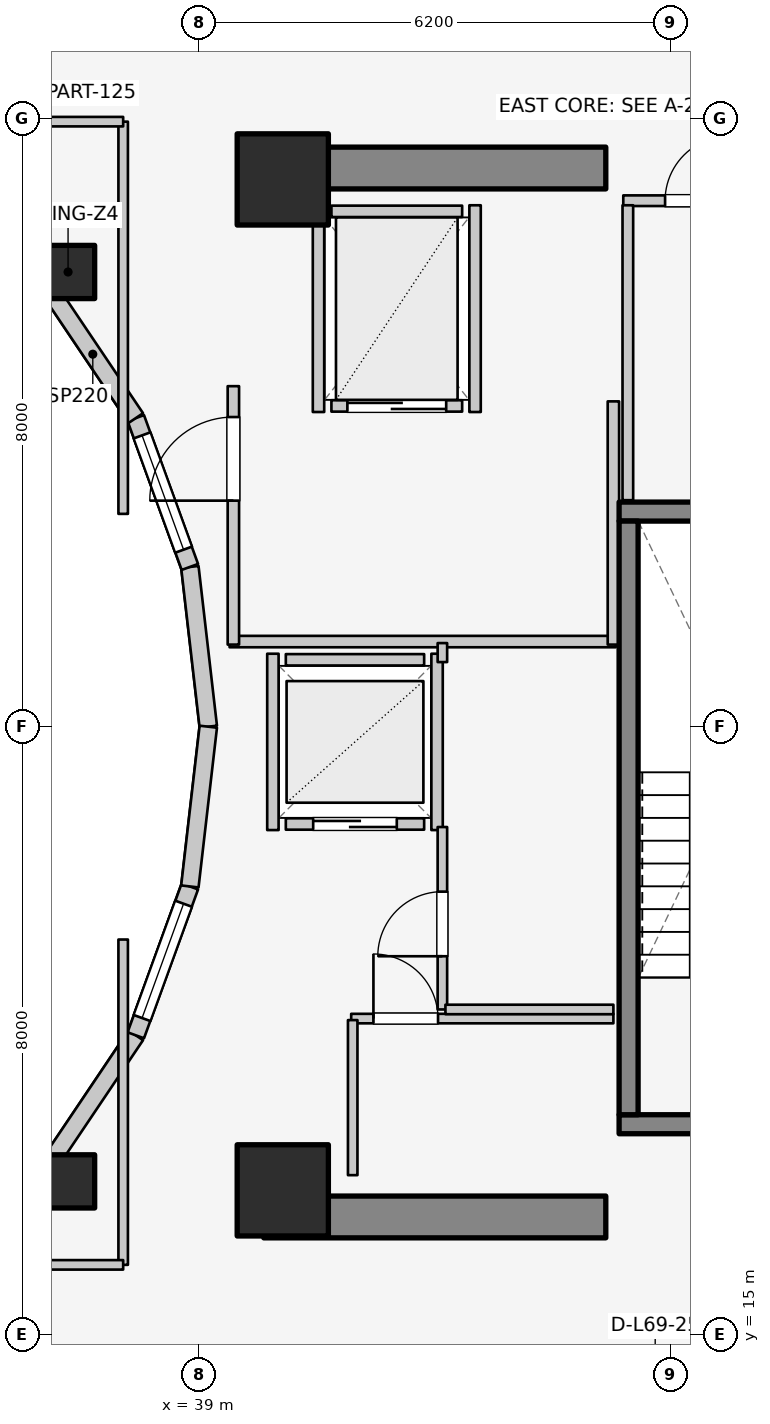
"""IFC4 building model, lengths in metres.
Left out: names, types, materials, properties, quantities, classifications, styles, units other than length and angle.
Written with IfcOpenShell. Run it as: python <this file> out.ifc"""

import sys

from ifc_helpers import new_model, si_unit, direction, frame, frame_2d, origin, origin_2d, place, context, subcontext, project, spatial, rectangle, extrude, element, fill, save


model = new_model("IFC4")
c1 = context("Model", 3, precision=1e-05, world=origin(), true_north=direction((0.0, 1.0)))
c2 = subcontext(c1, "Body", "Model", "MODEL_VIEW")
j1 = project(units=[si_unit("LENGTHUNIT", "METRE"), si_unit("PLANEANGLEUNIT", "RADIAN")], contexts=[c1])
p1 = place(None, origin())
s1 = spatial("IfcSite", under=j1, at=p1, CompositionType="ELEMENT")
p2 = place(p1, origin())
s2 = spatial("IfcBuilding", under=s1, at=p2, CompositionType="ELEMENT")
p3 = place(p2, frame((0.0, 0.0, 226.4)))
s3 = spatial("IfcBuildingStorey", under=s2, at=p3, CompositionType="ELEMENT", Elevation=226.4)
for number, where, z_axis, x_axis in (
    (1, (39.85, 16.55, 0.0), (0.0, 0.0, 1.0), (1.0, 0.0, 0.0)),
    (2, (39.85, 30.35, 0.0), (0.0, 0.0, 1.0), (1.0, 0.0, 0.0)),
):
    element("IfcWall", number, at=place(p3, frame(where, z_axis=z_axis, x_axis=x_axis)), inside=s3, PredefinedType="SHEAR", context=c2, shape_type="SweptSolid", body=[
        extrude(rectangle(XDim=4.5, YDim=0.55, at=frame_2d((2.25, 0.0))), origin(), (0.0, 0.0, 1.0), 3.1),
    ])
p4 = place(p3, frame((44.525, 17.77, 0.0), z_axis=(0.0, 0.0, 1.0), x_axis=(1.0, 0.0, 0.0)))
e3 = element("IfcWall", 3, at=p4, inside=s3, PredefinedType="SOLIDWALL", context=c2, shape_type="SweptSolid", body=[
    extrude(rectangle(XDim=3.37, YDim=0.25, at=frame_2d((1.685, 0.0))), origin(), (0.0, 0.0, 1.0), 3.1),
])
p5 = place(p4, frame((1.135, 0.0, 0.0)))
e4 = element("IfcOpeningElement", 4, at=p5, cuts=e3, PredefinedType="OPENING", context=c2, shape_type="SweptSolid", body=[
    extrude(rectangle(XDim=1.1, YDim=2.1, at=frame_2d((0.55, 1.05))), frame((0.0, 0.135, 0.0), z_axis=(0.0, -1.0, 0.0), x_axis=(1.0, 0.0, 0.0)), (0.0, 0.0, 1.0), 0.27),
])
p6 = place(p3, frame((44.525, 25.83, 0.0), z_axis=(0.0, 0.0, 1.0), x_axis=(1.0, 0.0, 0.0)))
e5 = element("IfcWall", 5, at=p6, inside=s3, PredefinedType="SOLIDWALL", context=c2, shape_type="SweptSolid", body=[
    extrude(rectangle(XDim=3.37, YDim=0.25, at=frame_2d((1.685, 0.0))), origin(), (0.0, 0.0, 1.0), 3.1),
])
p7 = place(p3, frame((44.65, 17.895, 0.0), z_axis=(0.0, 0.0, 1.0), x_axis=(0.0, 1.0, 0.0)))
e6 = element("IfcWall", 6, at=p7, inside=s3, PredefinedType="SOLIDWALL", context=c2, shape_type="SweptSolid", body=[
    extrude(rectangle(XDim=7.81, YDim=0.25, at=frame_2d((3.905, 0.0))), origin(), (0.0, 0.0, 1.0), 3.1),
])
for number, where, z_axis, x_axis in (
    (7, (40.1, 16.9, 0.0), (0.0, 0.0, 1.0), (1.0, 0.0, 0.0)),
    (8, (40.1, 30.2, 0.0), (0.0, 0.0, 1.0), (1.0, 0.0, 0.0)),
):
    element("IfcColumn", number, at=place(p3, frame(where, z_axis=z_axis, x_axis=x_axis)), inside=s3, PredefinedType="COLUMN", context=c2, shape_type="SweptSolid", body=[
        extrude(rectangle(XDim=1.2, YDim=1.2, at=origin_2d()), origin(), (0.0, 0.0, 1.0), 3.1),
    ])
for number, where, z_axis, x_axis in (
    (9, (37.275, 28.982, 0.0), (0.0, 0.0, 1.0), (1.0, 0.0, 0.0)),
    (10, (37.275, 17.018, 0.0), (0.0, 0.0, 1.0), (1.0, 0.0, 0.0)),
):
    element("IfcColumn", number, at=place(p3, frame(where, z_axis=z_axis, x_axis=x_axis)), inside=s3, PredefinedType="COLUMN", context=c2, shape_type="SweptSolid", body=[
        extrude(rectangle(XDim=0.7, YDim=0.7, at=origin_2d()), origin(), (0.0, 0.0, 1.0), 3.1),
    ])
p8 = place(p3, frame((39.12, 23.0, 0.0), z_axis=(0.0, 0.0, 1.0), x_axis=(-0.114711713601, 0.993398823617, 0.0)))
e11 = element("IfcWall", 11, at=p8, inside=s3, PredefinedType="STANDARD", context=c2, shape_type="SweptSolid", body=[
    extrude(rectangle(XDim=2.115, YDim=0.23, at=frame_2d((1.058, 0.0))), origin(), (0.0, 0.0, 1.0), 2.84),
])
p9 = place(p3, frame((38.877, 25.102, 0.0), z_axis=(0.0, 0.0, 1.0), x_axis=(-0.341423187295, 0.93990968033, 0.0)))
e12 = element("IfcWall", 12, at=p9, inside=s3, PredefinedType="STANDARD", context=c2, shape_type="SweptSolid", body=[
    extrude(rectangle(XDim=2.084, YDim=0.23, at=frame_2d((1.042, 0.0))), origin(), (0.0, 0.0, 1.0), 2.84),
])
p10 = place(p9, frame((0.242, 0.0, 0.85)))
e13 = element("IfcOpeningElement", 13, at=p10, cuts=e12, PredefinedType="OPENING", context=c2, shape_type="SweptSolid", body=[
    extrude(rectangle(XDim=1.6, YDim=1.65, at=frame_2d((0.8, 0.825))), frame((0.0, 0.125, 0.0), z_axis=(0.0, -1.0, 0.0), x_axis=(1.0, 0.0, 0.0)), (0.0, 0.0, 1.0), 0.25),
])
p11 = place(p3, frame((38.166, 27.06, 0.0), z_axis=(0.0, 0.0, 1.0), x_axis=(-0.558197800898, 0.829707909492, 0.0)))
e14 = element("IfcWall", 14, at=p11, inside=s3, PredefinedType="STANDARD", context=c2, shape_type="SweptSolid", body=[
    extrude(rectangle(XDim=2.027, YDim=0.23, at=frame_2d((1.013, 0.0))), origin(), (0.0, 0.0, 1.0), 2.16),
])
for number, where, z_axis, x_axis in (
    (15, (37.035, 28.742, 0.0), (0.0, 0.0, 1.0), (-0.753, 0.659, 0.0)),
    (16, (35.56, 15.968, 0.0), (0.0, 0.0, 1.0), (0.753, 0.659, 0.0)),
):
    element("IfcWall", number, at=place(p3, frame(where, z_axis=z_axis, x_axis=x_axis)), inside=s3, PredefinedType="STANDARD", context=c2, shape_type="SweptSolid", body=[
        extrude(rectangle(XDim=1.959, YDim=0.23, at=frame_2d((0.98, 0.0))), origin(), (0.0, 0.0, 1.0), 2.16),
    ])
p12 = place(p3, frame((37.035, 17.258, 0.0), z_axis=(0.0, 0.0, 1.0), x_axis=(0.558197800898, 0.829707909492, 0.0)))
e17 = element("IfcWall", 17, at=p12, inside=s3, PredefinedType="STANDARD", context=c2, shape_type="SweptSolid", body=[
    extrude(rectangle(XDim=2.027, YDim=0.23, at=frame_2d((1.013, 0.0))), origin(), (0.0, 0.0, 1.0), 2.16),
])
p13 = place(p3, frame((38.166, 18.94, 0.0), z_axis=(0.0, 0.0, 1.0), x_axis=(0.341423187295, 0.93990968033, 0.0)))
e18 = element("IfcWall", 18, at=p13, inside=s3, PredefinedType="STANDARD", context=c2, shape_type="SweptSolid", body=[
    extrude(rectangle(XDim=2.084, YDim=0.23, at=frame_2d((1.042, 0.0))), origin(), (0.0, 0.0, 1.0), 2.84),
])
p14 = place(p13, frame((0.242, 0.0, 0.85)))
e19 = element("IfcOpeningElement", 19, at=p14, cuts=e18, PredefinedType="OPENING", context=c2, shape_type="SweptSolid", body=[
    extrude(rectangle(XDim=1.6, YDim=1.65, at=frame_2d((0.8, 0.825))), frame((0.0, 0.125, 0.0), z_axis=(0.0, -1.0, 0.0), x_axis=(1.0, 0.0, 0.0)), (0.0, 0.0, 1.0), 0.25),
])
p15 = place(p3, frame((38.877, 20.898, 0.0), z_axis=(0.0, 0.0, 1.0), x_axis=(0.114711713601, 0.993398823617, 0.0)))
e20 = element("IfcWall", 20, at=p15, inside=s3, PredefinedType="STANDARD", context=c2, shape_type="SweptSolid", body=[
    extrude(rectangle(XDim=2.115, YDim=0.23, at=frame_2d((1.058, 0.0))), origin(), (0.0, 0.0, 1.0), 2.84),
])
p16 = place(p3, frame((40.14, 21.72, 0.0), z_axis=(0.0, 0.0, 1.0), x_axis=(1.0, 0.0, 0.0)))
e21 = element("IfcWall", 21, at=p16, inside=s3, PredefinedType="SOLIDWALL", context=c2, shape_type="SweptSolid", body=[
    extrude(rectangle(XDim=1.82, YDim=0.15, at=frame_2d((0.91, 0.0))), origin(), (0.0, 0.0, 1.0), 2.12),
])
p17 = place(p16, frame((0.36, 0.0, 0.0)))
e22 = element("IfcOpeningElement", 22, at=p17, cuts=e21, PredefinedType="OPENING", context=c2, shape_type="SweptSolid", body=[
    extrude(rectangle(XDim=1.1, YDim=2.1, at=frame_2d((0.55, 1.05))), frame((0.0, 0.085, 0.0), z_axis=(0.0, -1.0, 0.0), x_axis=(1.0, 0.0, 0.0)), (0.0, 0.0, 1.0), 0.17),
])
p18 = place(p3, frame((40.14, 23.88, 0.0), z_axis=(0.0, 0.0, 1.0), x_axis=(1.0, 0.0, 0.0)))
e23 = element("IfcWall", 23, at=p18, inside=s3, PredefinedType="SOLIDWALL", context=c2, shape_type="SweptSolid", body=[
    extrude(rectangle(XDim=1.82, YDim=0.15, at=frame_2d((0.91, 0.0))), origin(), (0.0, 0.0, 1.0), 2.12),
])
p19 = place(p3, frame((39.97, 21.64, 0.0), z_axis=(0.0, 0.0, 1.0), x_axis=(0.0, 1.0, 0.0)))
e24 = element("IfcWall", 24, at=p19, inside=s3, PredefinedType="SOLIDWALL", context=c2, shape_type="SweptSolid", body=[
    extrude(rectangle(XDim=2.32, YDim=0.15, at=frame_2d((1.16, 0.0))), origin(), (0.0, 0.0, 1.0), 2.12),
])
p20 = place(p3, frame((42.13, 21.64, 0.0), z_axis=(0.0, 0.0, 1.0), x_axis=(0.0, 1.0, 0.0)))
e25 = element("IfcWall", 25, at=p20, inside=s3, PredefinedType="SOLIDWALL", context=c2, shape_type="SweptSolid", body=[
    extrude(rectangle(XDim=2.32, YDim=0.15, at=frame_2d((1.16, 0.0))), origin(), (0.0, 0.0, 1.0), 2.855),
])
p21 = place(p3, frame((40.74, 27.22, 0.0), z_axis=(0.0, 0.0, 1.0), x_axis=(1.0, 0.0, 0.0)))
e26 = element("IfcWall", 26, at=p21, inside=s3, PredefinedType="SOLIDWALL", context=c2, shape_type="SweptSolid", body=[
    extrude(rectangle(XDim=1.72, YDim=0.15, at=frame_2d((0.86, 0.0))), origin(), (0.0, 0.0, 1.0), 2.855),
])
p22 = place(p21, frame((0.21, 0.0, 0.0)))
e27 = element("IfcOpeningElement", 27, at=p22, cuts=e26, PredefinedType="OPENING", context=c2, shape_type="SweptSolid", body=[
    extrude(rectangle(XDim=1.3, YDim=2.1, at=frame_2d((0.65, 1.05))), frame((0.0, 0.085, 0.0), z_axis=(0.0, -1.0, 0.0), x_axis=(1.0, 0.0, 0.0)), (0.0, 0.0, 1.0), 0.17),
])
p23 = place(p3, frame((40.74, 29.78, 0.0), z_axis=(0.0, 0.0, 1.0), x_axis=(1.0, 0.0, 0.0)))
e28 = element("IfcWall", 28, at=p23, inside=s3, PredefinedType="SOLIDWALL", context=c2, shape_type="SweptSolid", body=[
    extrude(rectangle(XDim=1.72, YDim=0.15, at=frame_2d((0.86, 0.0))), origin(), (0.0, 0.0, 1.0), 2.855),
])
for number, where, z_axis, x_axis in (
    (29, (40.57, 27.14, 0.0), (0.0, 0.0, 1.0), (0.0, 1.0, 0.0)),
    (30, (42.63, 27.14, 0.0), (0.0, 0.0, 1.0), (0.0, 1.0, 0.0)),
):
    element("IfcWall", number, at=place(p3, frame(where, z_axis=z_axis, x_axis=x_axis)), inside=s3, PredefinedType="SOLIDWALL", context=c2, shape_type="SweptSolid", body=[
        extrude(rectangle(XDim=2.72, YDim=0.15, at=frame_2d((1.36, 0.0))), origin(), (0.0, 0.0, 1.0), 2.855),
    ])
p24 = place(p3, frame((39.4, 24.12, 0.0), z_axis=(0.0, 0.0, 1.0), x_axis=(1.0, 0.0, 0.0)))
e31 = element("IfcWall", 31, at=p24, inside=s3, PredefinedType="PARTITIONING", context=c2, shape_type="SweptSolid", body=[
    extrude(rectangle(XDim=5.08, YDim=0.15, at=frame_2d((2.54, 0.0))), origin(), (0.0, 0.0, 1.0), 2.12),
])
p25 = place(p3, frame((44.45, 24.08, 0.0), z_axis=(0.0, 0.0, 1.0), x_axis=(0.0, 1.0, 0.0)))
e32 = element("IfcWall", 32, at=p25, inside=s3, PredefinedType="PARTITIONING", context=c2, shape_type="SweptSolid", body=[
    extrude(rectangle(XDim=3.2, YDim=0.15, at=frame_2d((1.6, 0.0))), origin(), (0.0, 0.0, 1.0), 2.855),
])
p26 = place(p3, frame((39.45, 24.08, 0.0), z_axis=(0.0, 0.0, 1.0), x_axis=(0.0, 1.0, 0.0)))
e33 = element("IfcWall", 33, at=p26, inside=s3, PredefinedType="PARTITIONING", context=c2, shape_type="SweptSolid", body=[
    extrude(rectangle(XDim=3.4, YDim=0.15, at=frame_2d((1.7, 0.0))), origin(), (0.0, 0.0, 1.0), 2.855),
])
p27 = place(p26, frame((1.894, 0.0, 0.0)))
e34 = element("IfcOpeningElement", 34, at=p27, cuts=e33, PredefinedType="OPENING", context=c2, shape_type="SweptSolid", body=[
    extrude(rectangle(XDim=1.1, YDim=2.1, at=frame_2d((0.55, 1.05))), frame((0.0, 0.085, 0.0), z_axis=(0.0, -1.0, 0.0), x_axis=(1.0, 0.0, 0.0)), (0.0, 0.0, 1.0), 0.17),
])
p28 = place(p3, frame((41.0, 19.16, 0.0), z_axis=(0.0, 0.0, 1.0), x_axis=(1.0, 0.0, 0.0)))
e35 = element("IfcWall", 35, at=p28, inside=s3, PredefinedType="PARTITIONING", context=c2, shape_type="SweptSolid", body=[
    extrude(rectangle(XDim=3.45, YDim=0.125, at=frame_2d((1.725, 0.0))), origin(), (0.0, 0.0, 1.0), 2.12),
])
p29 = place(p28, frame((0.293, 0.0, 0.0)))
e36 = element("IfcOpeningElement", 36, at=p29, cuts=e35, PredefinedType="OPENING", context=c2, shape_type="SweptSolid", body=[
    extrude(rectangle(XDim=0.85, YDim=2.05, at=frame_2d((0.425, 1.025))), frame((0.0, 0.073, 0.0), z_axis=(0.0, -1.0, 0.0), x_axis=(1.0, 0.0, 0.0)), (0.0, 0.0, 1.0), 0.145),
])
p30 = place(p3, frame((41.02, 17.1, 0.0), z_axis=(0.0, 0.0, 1.0), x_axis=(0.0, 1.0, 0.0)))
e37 = element("IfcWall", 37, at=p30, inside=s3, PredefinedType="PARTITIONING", context=c2, shape_type="SweptSolid", body=[
    extrude(rectangle(XDim=2.04, YDim=0.125, at=frame_2d((1.02, 0.0))), origin(), (0.0, 0.0, 1.0), 2.855),
])
p31 = place(p3, frame((42.2, 19.28, 0.0), z_axis=(0.0, 0.0, 1.0), x_axis=(0.0, 1.0, 0.0)))
e38 = element("IfcWall", 38, at=p31, inside=s3, PredefinedType="PARTITIONING", context=c2, shape_type="SweptSolid", body=[
    extrude(rectangle(XDim=2.4, YDim=0.125, at=frame_2d((1.2, 0.0))), origin(), (0.0, 0.0, 1.0), 2.855),
])
p32 = place(p31, frame((0.7, 0.0, 0.0)))
e39 = element("IfcOpeningElement", 39, at=p32, cuts=e38, PredefinedType="OPENING", context=c2, shape_type="SweptSolid", body=[
    extrude(rectangle(XDim=0.85, YDim=2.05, at=frame_2d((0.425, 1.025))), frame((0.0, 0.073, 0.0), z_axis=(0.0, -1.0, 0.0), x_axis=(1.0, 0.0, 0.0)), (0.0, 0.0, 1.0), 0.145),
])
p33 = place(p3, frame((42.2, 23.85, 0.0), z_axis=(0.0, 0.0, 1.0), x_axis=(0.0, 1.0, 0.0)))
e40 = element("IfcWall", 40, at=p33, inside=s3, PredefinedType="PARTITIONING", context=c2, shape_type="SweptSolid", body=[
    extrude(rectangle(XDim=0.25, YDim=0.125, at=frame_2d((0.125, 0.0))), origin(), (0.0, 0.0, 1.0), 2.855),
])
p34 = place(p3, frame((42.24, 19.28, 0.0), z_axis=(0.0, 0.0, 1.0), x_axis=(1.0, 0.0, 0.0)))
e41 = element("IfcWall", 41, at=p34, inside=s3, PredefinedType="PARTITIONING", context=c2, shape_type="SweptSolid", body=[
    extrude(rectangle(XDim=2.21, YDim=0.125, at=frame_2d((1.105, 0.0))), origin(), (0.0, 0.0, 1.0), 2.12),
])
p35 = place(p3, frame((44.58, 29.92, 0.0), z_axis=(0.0, 0.0, 1.0), x_axis=(1.0, 0.0, 0.0)))
e42 = element("IfcWall", 42, at=p35, inside=s3, PredefinedType="PLUMBINGWALL", context=c2, shape_type="SweptSolid", body=[
    extrude(rectangle(XDim=2.0, YDim=0.14, at=frame_2d((1.0, 0.0))), origin(), (0.0, 0.0, 1.0), 2.855),
])
p36 = place(p35, frame((0.55, 0.0, 0.0)))
e43 = element("IfcOpeningElement", 43, at=p36, cuts=e42, PredefinedType="OPENING", context=c2, shape_type="SweptSolid", body=[
    extrude(rectangle(XDim=0.85, YDim=2.05, at=frame_2d((0.425, 1.025))), frame((0.0, 0.08, 0.0), z_axis=(0.0, -1.0, 0.0), x_axis=(1.0, 0.0, 0.0)), (0.0, 0.0, 1.0), 0.16),
])
p37 = place(p3, frame((44.64, 25.98, 0.0), z_axis=(0.0, 0.0, 1.0), x_axis=(0.0, 1.0, 0.0)))
e44 = element("IfcWall", 44, at=p37, inside=s3, PredefinedType="PLUMBINGWALL", context=c2, shape_type="SweptSolid", body=[
    extrude(rectangle(XDim=3.88, YDim=0.14, at=frame_2d((1.94, 0.0))), origin(), (0.0, 0.0, 1.0), 2.855),
])
p38 = place(p3, frame((35.55, 30.015, 0.0), z_axis=(0.0, 0.0, 1.0), x_axis=(0.523992004803, 0.851723182086, 0.0)))
e45 = element("IfcWall", 45, at=p38, inside=s3, PredefinedType="PARTITIONING", context=c2, shape_type="SweptSolid", body=[
    extrude(rectangle(XDim=3.101, YDim=0.125, at=frame_2d((1.551, 0.0))), origin(), (0.0, 0.0, 1.0), 2.376),
])
p39 = place(p3, frame((38.0, 25.8, 0.0), z_axis=(0.0, 0.0, 1.0), x_axis=(0.0, 1.0, 0.0)))
e46 = element("IfcWall", 46, at=p39, inside=s3, PredefinedType="PARTITIONING", context=c2, shape_type="SweptSolid", body=[
    extrude(rectangle(XDim=5.16, YDim=0.125, at=frame_2d((2.58, 0.0))), origin(), (0.0, 0.0, 1.0), 2.232),
])
p40 = place(p3, frame((35.4, 30.96, 0.0), z_axis=(0.0, 0.0, 1.0), x_axis=(1.0, 0.0, 0.0)))
e47 = element("IfcWall", 47, at=p40, inside=s3, PredefinedType="PARTITIONING", context=c2, shape_type="SweptSolid", body=[
    extrude(rectangle(XDim=2.6, YDim=0.125, at=frame_2d((1.3, 0.0))), origin(), (0.0, 0.0, 1.0), 2.376),
])
p41 = place(p3, frame((38.0, 15.92, 0.0), z_axis=(0.0, 0.0, 1.0), x_axis=(0.0, 1.0, 0.0)))
e48 = element("IfcWall", 48, at=p41, inside=s3, PredefinedType="PARTITIONING", context=c2, shape_type="SweptSolid", body=[
    extrude(rectangle(XDim=4.28, YDim=0.125, at=frame_2d((2.14, 0.0))), origin(), (0.0, 0.0, 1.0), 2.232),
])
p42 = place(p3, frame((35.4, 15.92, 0.0), z_axis=(0.0, 0.0, 1.0), x_axis=(1.0, 0.0, 0.0)))
e49 = element("IfcWall", 49, at=p42, inside=s3, PredefinedType="PARTITIONING", context=c2, shape_type="SweptSolid", body=[
    extrude(rectangle(XDim=2.6, YDim=0.125, at=frame_2d((1.3, 0.0))), origin(), (0.0, 0.0, 1.0), 2.232),
])
p43 = place(p10, origin())
e50 = element("IfcWindow", 50, at=p43, inside=s3, PartitioningType="SINGLE_PANEL", PredefinedType="WINDOW", context=c2, shape_type="SweptSolid", body=[
    extrude(rectangle(XDim=1.6, YDim=1.65, at=frame_2d((0.8, 0.825))), frame((0.0, 0.03, 0.0), z_axis=(0.0, -1.0, 0.0), x_axis=(1.0, 0.0, 0.0)), (0.0, 0.0, 1.0), 0.06),
])
fill(e13, e50)
p44 = place(p14, origin())
e51 = element("IfcWindow", 51, at=p44, inside=s3, PartitioningType="SINGLE_PANEL", PredefinedType="WINDOW", context=c2, shape_type="SweptSolid", body=[
    extrude(rectangle(XDim=1.6, YDim=1.65, at=frame_2d((0.8, 0.825))), frame((0.0, 0.03, 0.0), z_axis=(0.0, -1.0, 0.0), x_axis=(1.0, 0.0, 0.0)), (0.0, 0.0, 1.0), 0.06),
])
fill(e19, e51)
p45 = place(p17, origin())
e52 = element("IfcDoor", 52, at=p45, inside=s3, OperationType="DOUBLE_DOOR_SLIDING", PredefinedType="DOOR", context=c2, shape_type="SweptSolid", body=[
    extrude(rectangle(XDim=1.1, YDim=2.1, at=frame_2d((0.55, 1.05))), frame((0.0, 0.025, 0.0), z_axis=(0.0, -1.0, 0.0), x_axis=(1.0, 0.0, 0.0)), (0.0, 0.0, 1.0), 0.05),
])
fill(e22, e52)
p46 = place(p22, origin())
e53 = element("IfcDoor", 53, at=p46, inside=s3, OperationType="DOUBLE_DOOR_SLIDING", PredefinedType="DOOR", context=c2, shape_type="SweptSolid", body=[
    extrude(rectangle(XDim=1.3, YDim=2.1, at=frame_2d((0.65, 1.05))), frame((0.0, 0.025, 0.0), z_axis=(0.0, -1.0, 0.0), x_axis=(1.0, 0.0, 0.0)), (0.0, 0.0, 1.0), 0.05),
])
fill(e27, e53)
p47 = place(p27, origin())
e54 = element("IfcDoor", 54, at=p47, inside=s3, OperationType="SINGLE_SWING_LEFT", PredefinedType="DOOR", context=c2, shape_type="SweptSolid", body=[
    extrude(rectangle(XDim=1.1, YDim=2.1, at=frame_2d((0.55, 1.05))), frame((0.0, 0.025, 0.0), z_axis=(0.0, -1.0, 0.0), x_axis=(1.0, 0.0, 0.0)), (0.0, 0.0, 1.0), 0.05),
])
fill(e34, e54)
p48 = place(p29, origin())
e55 = element("IfcDoor", 55, at=p48, inside=s3, OperationType="SINGLE_SWING_LEFT", PredefinedType="DOOR", context=c2, shape_type="SweptSolid", body=[
    extrude(rectangle(XDim=0.85, YDim=2.05, at=frame_2d((0.425, 1.025))), frame((0.0, 0.025, 0.0), z_axis=(0.0, -1.0, 0.0), x_axis=(1.0, 0.0, 0.0)), (0.0, 0.0, 1.0), 0.05),
])
fill(e36, e55)
p49 = place(p32, origin())
e56 = element("IfcDoor", 56, at=p49, inside=s3, OperationType="SINGLE_SWING_LEFT", PredefinedType="DOOR", context=c2, shape_type="SweptSolid", body=[
    extrude(rectangle(XDim=0.85, YDim=2.05, at=frame_2d((0.425, 1.025))), frame((0.0, 0.025, 0.0), z_axis=(0.0, -1.0, 0.0), x_axis=(1.0, 0.0, 0.0)), (0.0, 0.0, 1.0), 0.05),
])
fill(e39, e56)
p50 = place(p36, origin())
e57 = element("IfcDoor", 57, at=p50, inside=s3, OperationType="SINGLE_SWING_RIGHT", PredefinedType="DOOR", context=c2, shape_type="SweptSolid", body=[
    extrude(rectangle(XDim=0.85, YDim=2.05, at=frame_2d((0.425, 1.025))), frame((0.0, 0.025, 0.0), z_axis=(0.0, -1.0, 0.0), x_axis=(1.0, 0.0, 0.0)), (0.0, 0.0, 1.0), 0.05),
])
fill(e43, e57)
save(model, sys.argv[1])
